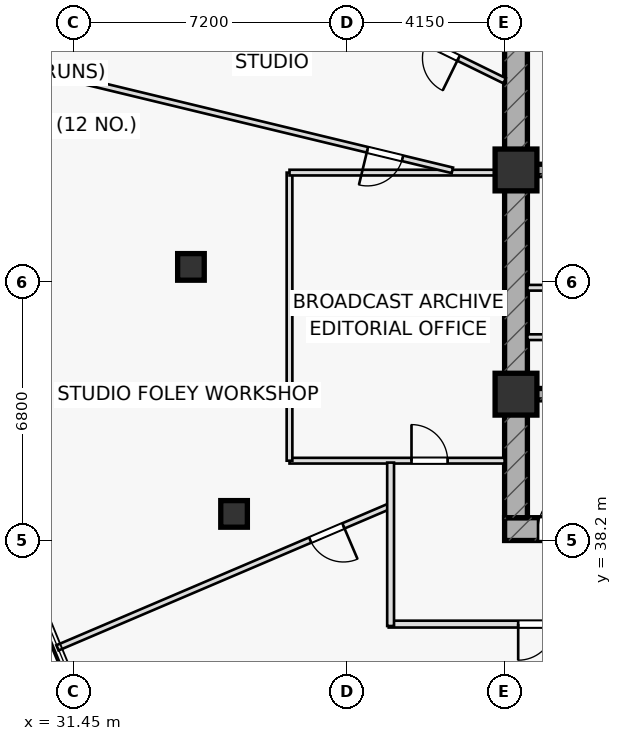
"""IFC4 building model, lengths in metres.
Left out: names, types, materials, properties, quantities, classifications, styles, units other than length and angle.
Written with IfcOpenShell. Run it as: python <this file> out.ifc"""

import sys

from ifc_helpers import new_model, si_unit, direction, frame, frame_2d, origin, origin_2d, place, context, subcontext, project, spatial, rectangle, hollow_rectangle, extrude, element, fill, save


model = new_model("IFC4")
c1 = context("Model", 3, precision=1e-05, world=origin(), true_north=direction((0.0, 1.0)))
c2 = subcontext(c1, "Body", "Model", "MODEL_VIEW")
j1 = project(units=[si_unit("LENGTHUNIT", "METRE"), si_unit("PLANEANGLEUNIT", "RADIAN")], contexts=[c1])
p1 = place(None, origin())
s1 = spatial("IfcSite", under=j1, at=p1, CompositionType="ELEMENT")
p2 = place(p1, origin())
s2 = spatial("IfcBuilding", under=s1, at=p2, CompositionType="ELEMENT")
p3 = place(p2, frame((0.0, 0.0, 150.25)))
s3 = spatial("IfcBuildingStorey", under=s2, at=p3, CompositionType="ELEMENT", Elevation=150.25)
p4 = place(p3, frame((42.8, 38.5, 0.0), z_axis=(0.0, 0.0, 1.0), x_axis=(1.0, 0.0, 0.0)))
e1 = element("IfcWall", 1, at=p4, inside=s3, PredefinedType="SHEAR", context=c2, shape_type="SweptSolid", body=[
    extrude(rectangle(XDim=14.4, YDim=0.6, at=frame_2d((7.2, 0.0))), origin(), (0.0, 0.0, 1.0), 3.55),
])
p5 = place(p4, frame((0.88, 0.0, 0.0)))
e2 = element("IfcOpeningElement", 2, at=p5, cuts=e1, PredefinedType="OPENING", context=c2, shape_type="SweptSolid", body=[
    extrude(rectangle(XDim=1.05, YDim=2.2, at=frame_2d((0.525, 1.1))), frame((0.0, 0.31, 0.0), z_axis=(0.0, -1.0, 0.0), x_axis=(1.0, 0.0, 0.0)), (0.0, 0.0, 1.0), 0.62),
])
p6 = place(p3, frame((43.1, 38.8, 0.0), z_axis=(0.0, 0.0, 1.0), x_axis=(0.0, 1.0, 0.0)))
e3 = element("IfcWall", 3, at=p6, inside=s3, PredefinedType="SHEAR", context=c2, shape_type="SweptSolid", body=[
    extrude(rectangle(XDim=12.4, YDim=0.6, at=frame_2d((6.2, 0.0))), origin(), (0.0, 0.0, 1.0), 3.55),
])
p7 = place(p3, frame((43.4, 47.95, 0.0), z_axis=(0.0, 0.0, 1.0), x_axis=(1.0, 0.0, 0.0)))
e4 = element("IfcWall", 4, at=p7, inside=s3, PredefinedType="SHEAR", context=c2, shape_type="SweptSolid", body=[
    extrude(rectangle(XDim=13.2, YDim=0.3, at=frame_2d((6.6, 0.0))), origin(), (0.0, 0.0, 1.0), 3.55),
])
p8 = place(p7, frame((8.345, 0.0, 0.0)))
e5 = element("IfcOpeningElement", 5, at=p8, cuts=e4, PredefinedType="OPENING", context=c2, shape_type="SweptSolid", body=[
    extrude(rectangle(XDim=1.15, YDim=2.2, at=frame_2d((0.575, 1.1))), frame((0.0, 0.16, 0.0), z_axis=(0.0, -1.0, 0.0), x_axis=(1.0, 0.0, 0.0)), (0.0, 0.0, 1.0), 0.32),
])
p9 = place(p7, frame((10.065, 0.0, 0.0)))
e6 = element("IfcOpeningElement", 6, at=p9, cuts=e4, PredefinedType="OPENING", context=c2, shape_type="SweptSolid", body=[
    extrude(rectangle(XDim=1.15, YDim=2.2, at=frame_2d((0.575, 1.1))), frame((0.0, 0.16, 0.0), z_axis=(0.0, -1.0, 0.0), x_axis=(1.0, 0.0, 0.0)), (0.0, 0.0, 1.0), 0.32),
])
p10 = place(p7, frame((11.645, 0.0, 0.0)))
e7 = element("IfcOpeningElement", 7, at=p10, cuts=e4, PredefinedType="OPENING", context=c2, shape_type="SweptSolid", body=[
    extrude(rectangle(XDim=1.15, YDim=2.2, at=frame_2d((0.575, 1.1))), frame((0.0, 0.16, 0.0), z_axis=(0.0, -1.0, 0.0), x_axis=(1.0, 0.0, 0.0)), (0.0, 0.0, 1.0), 0.32),
])
p11 = place(p3, frame((43.4, 42.05, 0.0), z_axis=(0.0, 0.0, 1.0), x_axis=(1.0, 0.0, 0.0)))
e8 = element("IfcWall", 8, at=p11, inside=s3, PredefinedType="SHEAR", context=c2, shape_type="SweptSolid", body=[
    extrude(rectangle(XDim=13.2, YDim=0.3, at=frame_2d((6.6, 0.0))), origin(), (0.0, 0.0, 1.0), 3.55),
])
p12 = place(p11, frame((8.37, 0.0, 0.0)))
e9 = element("IfcOpeningElement", 9, at=p12, cuts=e8, PredefinedType="OPENING", context=c2, shape_type="SweptSolid", body=[
    extrude(rectangle(XDim=1.1, YDim=2.15, at=frame_2d((0.55, 1.075))), frame((0.0, 0.16, 0.0), z_axis=(0.0, -1.0, 0.0), x_axis=(1.0, 0.0, 0.0)), (0.0, 0.0, 1.0), 0.32),
])
p13 = place(p11, frame((10.09, 0.0, 0.0)))
e10 = element("IfcOpeningElement", 10, at=p13, cuts=e8, PredefinedType="OPENING", context=c2, shape_type="SweptSolid", body=[
    extrude(rectangle(XDim=1.1, YDim=2.15, at=frame_2d((0.55, 1.075))), frame((0.0, 0.16, 0.0), z_axis=(0.0, -1.0, 0.0), x_axis=(1.0, 0.0, 0.0)), (0.0, 0.0, 1.0), 0.32),
])
p14 = place(p11, frame((11.83, 0.0, 0.0)))
e11 = element("IfcOpeningElement", 11, at=p14, cuts=e8, PredefinedType="OPENING", context=c2, shape_type="SweptSolid", body=[
    extrude(rectangle(XDim=1.1, YDim=2.15, at=frame_2d((0.55, 1.075))), frame((0.0, 0.16, 0.0), z_axis=(0.0, -1.0, 0.0), x_axis=(1.0, 0.0, 0.0)), (0.0, 0.0, 1.0), 0.32),
])
for number, where, z_axis, x_axis in (
    (12, (43.1, 47.95, 0.0), (0.0, 0.0, 1.0), (1.0, 0.0, 0.0)),
    (13, (43.1, 42.05, 0.0), (0.0, 0.0, 1.0), (1.0, 0.0, 0.0)),
):
    element("IfcColumn", number, at=place(p3, frame(where, z_axis=z_axis, x_axis=x_axis)), inside=s3, PredefinedType="COLUMN", context=c2, shape_type="SweptSolid", body=[
        extrude(rectangle(XDim=1.1, YDim=1.1, at=origin_2d()), origin(), (0.0, 0.0, 1.0), 3.55),
    ])
for number, where, z_axis, x_axis in (
    (14, (34.546, 45.399, 0.0), (0.0, 0.0, 1.0), (1.0, 0.0, 0.0)),
    (15, (35.681, 38.9, 0.0), (0.0, 0.0, 1.0), (1.0, 0.0, 0.0)),
):
    element("IfcColumn", number, at=place(p3, frame(where, z_axis=z_axis, x_axis=x_axis)), inside=s3, PredefinedType="COLUMN", context=c2, shape_type="SweptSolid", body=[
        extrude(hollow_rectangle(XDim=0.7, YDim=0.7, WallThickness=0.04, at=origin_2d()), origin(), (0.0, 0.0, 1.0), 3.55),
    ])
for number, where, z_axis, x_axis in (
    (16, (43.4, 43.55, 0.0), (0.0, 0.0, 1.0), (1.0, 0.0, 0.0)),
    (17, (43.4, 44.85, 0.0), (0.0, 0.0, 1.0), (1.0, 0.0, 0.0)),
):
    element("IfcWall", number, at=place(p3, frame(where, z_axis=z_axis, x_axis=x_axis)), inside=s3, PredefinedType="PARTITIONING", context=c2, shape_type="SweptSolid", body=[
        extrude(rectangle(XDim=2.35, YDim=0.15, at=frame_2d((1.175, 0.0))), origin(), (0.0, 0.0, 1.0), 3.55),
    ])
p15 = place(p3, frame((37.14, 40.3, 0.0), z_axis=(0.0, 0.0, 1.0), x_axis=(1.0, 0.0, 0.0)))
e18 = element("IfcWall", 18, at=p15, inside=s3, PredefinedType="PARTITIONING", context=c2, shape_type="SweptSolid", body=[
    extrude(rectangle(XDim=5.66, YDim=0.15, at=frame_2d((2.83, 0.0))), origin(), (0.0, 0.0, 1.0), 3.55),
])
p16 = place(p15, frame((3.21, 0.0, 0.0)))
e19 = element("IfcOpeningElement", 19, at=p16, cuts=e18, PredefinedType="OPENING", context=c2, shape_type="SweptSolid", body=[
    extrude(rectangle(XDim=0.95, YDim=2.05, at=frame_2d((0.475, 1.025))), frame((0.0, 0.085, 0.0), z_axis=(0.0, -1.0, 0.0), x_axis=(1.0, 0.0, 0.0)), (0.0, 0.0, 1.0), 0.17),
])
p17 = place(p3, frame((37.14, 40.3, 0.0), z_axis=(0.0, 0.0, 1.0), x_axis=(0.0, 1.0, 0.0)))
e20 = element("IfcWall", 20, at=p17, inside=s3, PredefinedType="PARTITIONING", context=c2, shape_type="SweptSolid", body=[
    extrude(rectangle(XDim=7.58, YDim=0.15, at=frame_2d((3.79, 0.0))), origin(), (0.0, 0.0, 1.0), 2.835),
])
p18 = place(p3, frame((37.14, 47.88, 0.0), z_axis=(0.0, 0.0, 1.0), x_axis=(1.0, 0.0, 0.0)))
e21 = element("IfcWall", 21, at=p18, inside=s3, PredefinedType="PARTITIONING", context=c2, shape_type="SweptSolid", body=[
    extrude(rectangle(XDim=5.66, YDim=0.15, at=frame_2d((2.83, 0.0))), origin(), (0.0, 0.0, 1.0), 2.835),
])
p19 = place(p3, frame((42.8, 50.297, 0.0), z_axis=(0.0, 0.0, 1.0), x_axis=(-0.897818546691, 0.440365594951, 0.0)))
e22 = element("IfcWall", 22, at=p19, inside=s3, PredefinedType="PARTITIONING", context=c2, shape_type="SweptSolid", body=[
    extrude(rectangle(XDim=12.502, YDim=0.15, at=frame_2d((6.251, 0.0))), origin(), (0.0, 0.0, 1.0), 2.835),
])
p20 = place(p19, frame((1.35, 0.0, 0.0)))
e23 = element("IfcOpeningElement", 23, at=p20, cuts=e22, PredefinedType="OPENING", context=c2, shape_type="SweptSolid", body=[
    extrude(rectangle(XDim=0.95, YDim=2.05, at=frame_2d((0.475, 1.025))), frame((0.0, 0.085, 0.0), z_axis=(0.0, -1.0, 0.0), x_axis=(1.0, 0.0, 0.0)), (0.0, 0.0, 1.0), 0.17),
])
p21 = place(p3, frame((41.426, 47.94, 0.0), z_axis=(0.0, 0.0, 1.0), x_axis=(-0.972054043984, 0.234757184288, 0.0)))
e24 = element("IfcWall", 24, at=p21, inside=s3, PredefinedType="PARTITIONING", context=c2, shape_type="SweptSolid", body=[
    extrude(rectangle(XDim=11.525, YDim=0.15, at=frame_2d((5.762, 0.0))), origin(), (0.0, 0.0, 1.0), 2.835),
])
p22 = place(p21, frame((1.35, 0.0, 0.0)))
e25 = element("IfcOpeningElement", 25, at=p22, cuts=e24, PredefinedType="OPENING", context=c2, shape_type="SweptSolid", body=[
    extrude(rectangle(XDim=0.95, YDim=2.05, at=frame_2d((0.475, 1.025))), frame((0.0, 0.085, 0.0), z_axis=(0.0, -1.0, 0.0), x_axis=(1.0, 0.0, 0.0)), (0.0, 0.0, 1.0), 0.17),
])
p23 = place(p3, frame((39.8, 39.114, 0.0), z_axis=(0.0, 0.0, 1.0), x_axis=(-0.919828711425, -0.392320202945, 0.0)))
e26 = element("IfcWall", 26, at=p23, inside=s3, PredefinedType="PARTITIONING", context=c2, shape_type="SweptSolid", body=[
    extrude(rectangle(XDim=9.53, YDim=0.15, at=frame_2d((4.765, 0.0))), origin(), (0.0, 0.0, 1.0), 2.835),
])
p24 = place(p23, frame((1.35, 0.0, 0.0)))
e27 = element("IfcOpeningElement", 27, at=p24, cuts=e26, PredefinedType="OPENING", context=c2, shape_type="SweptSolid", body=[
    extrude(rectangle(XDim=0.95, YDim=2.05, at=frame_2d((0.475, 1.025))), frame((0.0, 0.085, 0.0), z_axis=(0.0, -1.0, 0.0), x_axis=(1.0, 0.0, 0.0)), (0.0, 0.0, 1.0), 0.17),
])
p25 = place(p3, frame((47.372, 36.0, 0.0), z_axis=(0.0, 0.0, 1.0), x_axis=(-0.56901614821, -0.82232634828, 0.0)))
e28 = element("IfcWall", 28, at=p25, inside=s3, PredefinedType="PARTITIONING", context=c2, shape_type="SweptSolid", body=[
    extrude(rectangle(XDim=19.192, YDim=0.15, at=frame_2d((9.596, 0.0))), origin(), (0.0, 0.0, 1.0), 2.835),
])
p26 = place(p3, frame((49.563, 36.0, 0.0), z_axis=(0.0, 0.0, 1.0), x_axis=(-0.409239647619, -0.912426934508, 0.0)))
e29 = element("IfcWall", 29, at=p26, inside=s3, PredefinedType="PARTITIONING", context=c2, shape_type="SweptSolid", body=[
    extrude(rectangle(XDim=18.846, YDim=0.15, at=frame_2d((9.423, 0.0))), origin(), (0.0, 0.0, 1.0), 2.835),
])
p27 = place(p3, frame((59.45, 36.0, 0.0), z_axis=(0.0, 0.0, 1.0), x_axis=(-1.0, 0.0, 0.0)))
e30 = element("IfcWall", 30, at=p27, inside=s3, PredefinedType="PARTITIONING", context=c2, shape_type="SweptSolid", body=[
    extrude(rectangle(XDim=19.7, YDim=0.18, at=frame_2d((9.85, 0.0))), origin(), (0.0, 0.0, 1.0), 2.835),
])
p28 = place(p27, frame((1.035, 0.0, 0.0)))
e31 = element("IfcOpeningElement", 31, at=p28, cuts=e30, PredefinedType="OPENING", context=c2, shape_type="SweptSolid", body=[
    extrude(rectangle(XDim=0.95, YDim=2.05, at=frame_2d((0.475, 1.025))), frame((0.0, 0.1, 0.0), z_axis=(0.0, -1.0, 0.0), x_axis=(1.0, 0.0, 0.0)), (0.0, 0.0, 1.0), 0.2),
])
p29 = place(p27, frame((5.885, 0.0, 0.0)))
e32 = element("IfcOpeningElement", 32, at=p29, cuts=e30, PredefinedType="OPENING", context=c2, shape_type="SweptSolid", body=[
    extrude(rectangle(XDim=0.95, YDim=2.05, at=frame_2d((0.475, 1.025))), frame((0.0, 0.1, 0.0), z_axis=(0.0, -1.0, 0.0), x_axis=(1.0, 0.0, 0.0)), (0.0, 0.0, 1.0), 0.2),
])
p30 = place(p27, frame((10.567, 0.0, 0.0)))
e33 = element("IfcOpeningElement", 33, at=p30, cuts=e30, PredefinedType="OPENING", context=c2, shape_type="SweptSolid", body=[
    extrude(rectangle(XDim=0.95, YDim=2.05, at=frame_2d((0.475, 1.025))), frame((0.0, 0.1, 0.0), z_axis=(0.0, -1.0, 0.0), x_axis=(1.0, 0.0, 0.0)), (0.0, 0.0, 1.0), 0.2),
])
p31 = place(p27, frame((15.343, 0.0, 0.0)))
e34 = element("IfcOpeningElement", 34, at=p31, cuts=e30, PredefinedType="OPENING", context=c2, shape_type="SweptSolid", body=[
    extrude(rectangle(XDim=0.95, YDim=2.05, at=frame_2d((0.475, 1.025))), frame((0.0, 0.1, 0.0), z_axis=(0.0, -1.0, 0.0), x_axis=(1.0, 0.0, 0.0)), (0.0, 0.0, 1.0), 0.2),
])
p32 = place(p3, frame((39.8, 35.95, 0.0), z_axis=(0.0, 0.0, 1.0), x_axis=(0.0, 1.0, 0.0)))
e35 = element("IfcWall", 35, at=p32, inside=s3, PredefinedType="PARTITIONING", context=c2, shape_type="SweptSolid", body=[
    extrude(rectangle(XDim=4.3, YDim=0.18, at=frame_2d((2.15, 0.0))), origin(), (0.0, 0.0, 1.0), 2.835),
])
p33 = place(p5, origin())
e36 = element("IfcDoor", 36, at=p33, inside=s3, OperationType="SINGLE_SWING_RIGHT", PredefinedType="DOOR", context=c2, shape_type="SweptSolid", body=[
    extrude(rectangle(XDim=1.05, YDim=2.2, at=frame_2d((0.525, 1.1))), frame((0.0, 0.025, 0.0), z_axis=(0.0, -1.0, 0.0), x_axis=(1.0, 0.0, 0.0)), (0.0, 0.0, 1.0), 0.05),
])
fill(e2, e36)
p34 = place(p16, origin())
e37 = element("IfcDoor", 37, at=p34, inside=s3, OperationType="SINGLE_SWING_LEFT", PredefinedType="DOOR", context=c2, shape_type="SweptSolid", body=[
    extrude(rectangle(XDim=0.95, YDim=2.05, at=frame_2d((0.475, 1.025))), frame((0.0, 0.025, 0.0), z_axis=(0.0, -1.0, 0.0), x_axis=(1.0, 0.0, 0.0)), (0.0, 0.0, 1.0), 0.05),
])
fill(e19, e37)
p35 = place(p20, origin())
e38 = element("IfcDoor", 38, at=p35, inside=s3, OperationType="SINGLE_SWING_LEFT", PredefinedType="DOOR", context=c2, shape_type="SweptSolid", body=[
    extrude(rectangle(XDim=0.95, YDim=2.05, at=frame_2d((0.475, 1.025))), frame((0.0, 0.025, 0.0), z_axis=(0.0, -1.0, 0.0), x_axis=(1.0, 0.0, 0.0)), (0.0, 0.0, 1.0), 0.05),
])
fill(e23, e38)
p36 = place(p22, origin())
e39 = element("IfcDoor", 39, at=p36, inside=s3, OperationType="SINGLE_SWING_RIGHT", PredefinedType="DOOR", context=c2, shape_type="SweptSolid", body=[
    extrude(rectangle(XDim=0.95, YDim=2.05, at=frame_2d((0.475, 1.025))), frame((0.0, 0.025, 0.0), z_axis=(0.0, -1.0, 0.0), x_axis=(1.0, 0.0, 0.0)), (0.0, 0.0, 1.0), 0.05),
])
fill(e25, e39)
p37 = place(p24, origin())
e40 = element("IfcDoor", 40, at=p37, inside=s3, OperationType="SINGLE_SWING_LEFT", PredefinedType="DOOR", context=c2, shape_type="SweptSolid", body=[
    extrude(rectangle(XDim=0.95, YDim=2.05, at=frame_2d((0.475, 1.025))), frame((0.0, 0.025, 0.0), z_axis=(0.0, -1.0, 0.0), x_axis=(1.0, 0.0, 0.0)), (0.0, 0.0, 1.0), 0.05),
])
fill(e27, e40)
p38 = place(p31, origin())
e41 = element("IfcDoor", 41, at=p38, inside=s3, OperationType="SINGLE_SWING_RIGHT", PredefinedType="DOOR", context=c2, shape_type="SweptSolid", body=[
    extrude(rectangle(XDim=0.95, YDim=2.05, at=frame_2d((0.475, 1.025))), frame((0.0, 0.025, 0.0), z_axis=(0.0, -1.0, 0.0), x_axis=(1.0, 0.0, 0.0)), (0.0, 0.0, 1.0), 0.05),
])
fill(e34, e41)
save(model, sys.argv[1])
